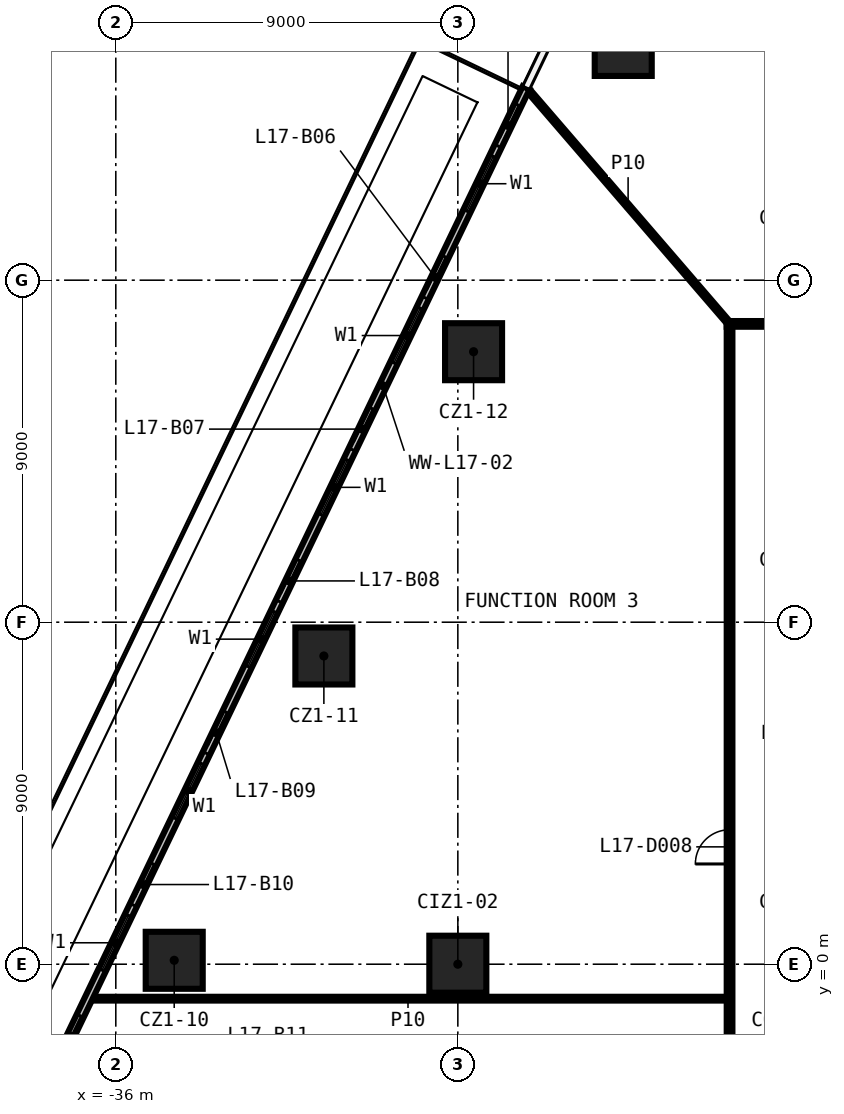
"""IFC4 building model, lengths in metres.
Left out: names, types, materials, properties, quantities, classifications, styles, units other than length and angle.
Written with IfcOpenShell. Run it as: python <this file> out.ifc"""

import sys

from ifc_helpers import new_model, si_unit, direction, frame, frame_2d, origin, origin_2d, place, context, subcontext, project, spatial, rectangle, extrude, element, fill, save


model = new_model("IFC4")
c1 = context("Model", 3, precision=1e-05, world=origin(), true_north=direction((0.0, 1.0)))
c2 = subcontext(c1, "Body", "Model", "MODEL_VIEW")
j1 = project(units=[si_unit("LENGTHUNIT", "METRE"), si_unit("PLANEANGLEUNIT", "RADIAN")], contexts=[c1])
p1 = place(None, origin())
s1 = spatial("IfcSite", under=j1, at=p1, CompositionType="ELEMENT")
p2 = place(p1, origin())
s2 = spatial("IfcBuilding", under=s1, at=p2, CompositionType="ELEMENT")
p3 = place(p2, frame((0.0, 0.0, 84.7)))
s3 = spatial("IfcBuildingStorey", under=s2, at=p3, CompositionType="ELEMENT", Elevation=84.7)
for number, where, z_axis, x_axis in (
    (1, (-34.463, 0.103, 0.0), (0.0, 0.0, 1.0), (1.0, 0.0, 0.0)),
    (2, (-30.525, 8.111, 0.0), (0.0, 0.0, 1.0), (1.0, 0.0, 0.0)),
    (3, (-26.586, 16.118, 0.0), (0.0, 0.0, 1.0), (1.0, 0.0, 0.0)),
    (4, (-22.648, 24.125, 0.0), (0.0, 0.0, 1.0), (1.0, 0.0, 0.0)),
    (5, (-27.0, 0.0, 0.0), (0.0, 0.0, 1.0), (1.0, 0.0, 0.0)),
):
    element("IfcColumn", number, at=place(p3, frame(where, z_axis=z_axis, x_axis=x_axis)), inside=s3, PredefinedType="COLUMN", context=c2, shape_type="SweptSolid", body=[
        extrude(rectangle(XDim=1.5, YDim=1.5, at=origin_2d()), origin(), (0.0, 0.0, 1.0), 3.9),
    ])
p4 = place(p3, frame((-36.698, -0.907, 0.0), z_axis=(0.0, 0.0, 1.0), x_axis=(1.0, 0.0, 0.0)))
e6 = element("IfcWall", 6, at=p4, inside=s3, PredefinedType="PARTITIONING", context=c2, shape_type="SweptSolid", body=[
    extrude(rectangle(XDim=16.772, YDim=0.1, at=frame_2d((8.386, 0.0))), origin(), (0.0, 0.0, 1.0), 3.9),
])
p5 = place(p3, frame((-19.925, 16.85, 0.0), z_axis=(0.0, 0.0, 1.0), x_axis=(1.0, 0.0, 0.0)))
e7 = element("IfcWall", 7, at=p5, inside=s3, PredefinedType="PARTITIONING", context=c2, shape_type="SweptSolid", body=[
    extrude(rectangle(XDim=39.85, YDim=0.15, at=frame_2d((19.925, 0.0))), origin(), (0.0, 0.0, 1.0), 3.9),
])
p6 = place(p5, frame((13.017, 0.0, 0.0)))
e8 = element("IfcOpeningElement", 8, at=p6, cuts=e7, PredefinedType="OPENING", context=c2, shape_type="SweptSolid", body=[
    extrude(rectangle(XDim=0.9, YDim=2.1, at=frame_2d((0.45, 1.05))), frame((0.0, 0.085, 0.0), z_axis=(0.0, -1.0, 0.0), x_axis=(1.0, 0.0, 0.0)), (0.0, 0.0, 1.0), 0.17),
])
p7 = place(p5, frame((3.887, 0.0, 0.0)))
e9 = element("IfcOpeningElement", 9, at=p7, cuts=e7, PredefinedType="OPENING", context=c2, shape_type="SweptSolid", body=[
    extrude(rectangle(XDim=0.9, YDim=2.1, at=frame_2d((0.45, 1.05))), frame((0.0, 0.085, 0.0), z_axis=(0.0, -1.0, 0.0), x_axis=(1.0, 0.0, 0.0)), (0.0, 0.0, 1.0), 0.17),
])
p8 = place(p3, frame((-19.85, -16.775, 0.0), z_axis=(0.0, 0.0, 1.0), x_axis=(0.0, 1.0, 0.0)))
e10 = element("IfcWall", 10, at=p8, inside=s3, PredefinedType="PARTITIONING", context=c2, shape_type="SweptSolid", body=[
    extrude(rectangle(XDim=33.55, YDim=0.15, at=frame_2d((16.775, 0.0))), origin(), (0.0, 0.0, 1.0), 3.9),
])
p9 = place(p8, frame((4.232, 0.0, 0.0)))
e11 = element("IfcOpeningElement", 11, at=p9, cuts=e10, PredefinedType="OPENING", context=c2, shape_type="SweptSolid", body=[
    extrude(rectangle(XDim=0.9, YDim=2.1, at=frame_2d((0.45, 1.05))), frame((0.0, 0.085, 0.0), z_axis=(0.0, -1.0, 0.0), x_axis=(1.0, 0.0, 0.0)), (0.0, 0.0, 1.0), 0.17),
])
p10 = place(p8, frame((19.413, 0.0, 0.0)))
e12 = element("IfcOpeningElement", 12, at=p10, cuts=e10, PredefinedType="OPENING", context=c2, shape_type="SweptSolid", body=[
    extrude(rectangle(XDim=0.9, YDim=2.1, at=frame_2d((0.45, 1.05))), frame((0.0, 0.085, 0.0), z_axis=(0.0, -1.0, 0.0), x_axis=(1.0, 0.0, 0.0)), (0.0, 0.0, 1.0), 0.17),
])
p11 = place(p3, frame((-25.189, 23.046, 0.0), z_axis=(0.0, 0.0, 1.0), x_axis=(0.652758316805, -0.757566221424, 0.0)))
e13 = element("IfcWall", 13, at=p11, inside=s3, PredefinedType="PARTITIONING", context=c2, shape_type="SweptSolid", body=[
    extrude(rectangle(XDim=8.178, YDim=0.1, at=frame_2d((4.089, 0.0))), origin(), (0.0, 0.0, 1.0), 3.9),
])
p12 = place(p3, frame((-25.203, 23.062, 0.0), z_axis=(0.0, 0.0, 1.0), x_axis=(-0.4330751292, -0.901357827097, 0.0)))
e14 = element("IfcWall", 14, at=p12, inside=s3, PredefinedType="SOLIDWALL", context=c2, shape_type="SweptSolid", body=[
    extrude(rectangle(XDim=31.024, YDim=0.2, at=frame_2d((15.512, 0.0))), origin(), (0.0, 0.0, 1.0), 3.9),
])
p13 = place(p12, frame((2.0, 0.0, 0.6)))
e15 = element("IfcOpeningElement", 15, at=p13, cuts=e14, PredefinedType="OPENING", context=c2, shape_type="SweptSolid", body=[
    extrude(rectangle(XDim=1.6, YDim=2.4, at=frame_2d((0.8, 1.2))), frame((0.0, 0.11, 0.0), z_axis=(0.0, -1.0, 0.0), x_axis=(1.0, 0.0, 0.0)), (0.0, 0.0, 1.0), 0.22),
])
p14 = place(p12, frame((0.5, 0.0, 0.0)))
e16 = element("IfcOpeningElement", 16, at=p14, cuts=e14, PredefinedType="OPENING", context=c2, shape_type="SweptSolid", body=[
    extrude(rectangle(XDim=1.2, YDim=2.4, at=frame_2d((0.6, 1.2))), frame((0.0, 0.11, 0.0), z_axis=(0.0, -1.0, 0.0), x_axis=(1.0, 0.0, 0.0)), (0.0, 0.0, 1.0), 0.22),
])
p15 = place(p12, frame((6.432, 0.0, 0.6)))
e17 = element("IfcOpeningElement", 17, at=p15, cuts=e14, PredefinedType="OPENING", context=c2, shape_type="SweptSolid", body=[
    extrude(rectangle(XDim=1.6, YDim=2.4, at=frame_2d((0.8, 1.2))), frame((0.0, 0.11, 0.0), z_axis=(0.0, -1.0, 0.0), x_axis=(1.0, 0.0, 0.0)), (0.0, 0.0, 1.0), 0.22),
])
p16 = place(p12, frame((4.932, 0.0, 0.0)))
e18 = element("IfcOpeningElement", 18, at=p16, cuts=e14, PredefinedType="OPENING", context=c2, shape_type="SweptSolid", body=[
    extrude(rectangle(XDim=1.2, YDim=2.4, at=frame_2d((0.6, 1.2))), frame((0.0, 0.11, 0.0), z_axis=(0.0, -1.0, 0.0), x_axis=(1.0, 0.0, 0.0)), (0.0, 0.0, 1.0), 0.22),
])
p17 = place(p12, frame((10.864, 0.0, 0.6)))
e19 = element("IfcOpeningElement", 19, at=p17, cuts=e14, PredefinedType="OPENING", context=c2, shape_type="SweptSolid", body=[
    extrude(rectangle(XDim=1.6, YDim=2.4, at=frame_2d((0.8, 1.2))), frame((0.0, 0.11, 0.0), z_axis=(0.0, -1.0, 0.0), x_axis=(1.0, 0.0, 0.0)), (0.0, 0.0, 1.0), 0.22),
])
p18 = place(p12, frame((9.364, 0.0, 0.0)))
e20 = element("IfcOpeningElement", 20, at=p18, cuts=e14, PredefinedType="OPENING", context=c2, shape_type="SweptSolid", body=[
    extrude(rectangle(XDim=1.2, YDim=2.4, at=frame_2d((0.6, 1.2))), frame((0.0, 0.11, 0.0), z_axis=(0.0, -1.0, 0.0), x_axis=(1.0, 0.0, 0.0)), (0.0, 0.0, 1.0), 0.22),
])
p19 = place(p12, frame((15.296, 0.0, 0.6)))
e21 = element("IfcOpeningElement", 21, at=p19, cuts=e14, PredefinedType="OPENING", context=c2, shape_type="SweptSolid", body=[
    extrude(rectangle(XDim=1.6, YDim=2.4, at=frame_2d((0.8, 1.2))), frame((0.0, 0.11, 0.0), z_axis=(0.0, -1.0, 0.0), x_axis=(1.0, 0.0, 0.0)), (0.0, 0.0, 1.0), 0.22),
])
p20 = place(p12, frame((13.796, 0.0, 0.0)))
e22 = element("IfcOpeningElement", 22, at=p20, cuts=e14, PredefinedType="OPENING", context=c2, shape_type="SweptSolid", body=[
    extrude(rectangle(XDim=1.2, YDim=2.4, at=frame_2d((0.6, 1.2))), frame((0.0, 0.11, 0.0), z_axis=(0.0, -1.0, 0.0), x_axis=(1.0, 0.0, 0.0)), (0.0, 0.0, 1.0), 0.22),
])
p21 = place(p12, frame((19.728, 0.0, 0.6)))
e23 = element("IfcOpeningElement", 23, at=p21, cuts=e14, PredefinedType="OPENING", context=c2, shape_type="SweptSolid", body=[
    extrude(rectangle(XDim=1.6, YDim=2.4, at=frame_2d((0.8, 1.2))), frame((0.0, 0.11, 0.0), z_axis=(0.0, -1.0, 0.0), x_axis=(1.0, 0.0, 0.0)), (0.0, 0.0, 1.0), 0.22),
])
p22 = place(p12, frame((18.228, 0.0, 0.0)))
e24 = element("IfcOpeningElement", 24, at=p22, cuts=e14, PredefinedType="OPENING", context=c2, shape_type="SweptSolid", body=[
    extrude(rectangle(XDim=1.2, YDim=2.4, at=frame_2d((0.6, 1.2))), frame((0.0, 0.11, 0.0), z_axis=(0.0, -1.0, 0.0), x_axis=(1.0, 0.0, 0.0)), (0.0, 0.0, 1.0), 0.22),
])
p23 = place(p12, frame((24.16, 0.0, 0.6)))
e25 = element("IfcOpeningElement", 25, at=p23, cuts=e14, PredefinedType="OPENING", context=c2, shape_type="SweptSolid", body=[
    extrude(rectangle(XDim=1.6, YDim=2.4, at=frame_2d((0.8, 1.2))), frame((0.0, 0.11, 0.0), z_axis=(0.0, -1.0, 0.0), x_axis=(1.0, 0.0, 0.0)), (0.0, 0.0, 1.0), 0.22),
])
p24 = place(p12, frame((22.66, 0.0, 0.0)))
e26 = element("IfcOpeningElement", 26, at=p24, cuts=e14, PredefinedType="OPENING", context=c2, shape_type="SweptSolid", body=[
    extrude(rectangle(XDim=1.2, YDim=2.4, at=frame_2d((0.6, 1.2))), frame((0.0, 0.11, 0.0), z_axis=(0.0, -1.0, 0.0), x_axis=(1.0, 0.0, 0.0)), (0.0, 0.0, 1.0), 0.22),
])
p25 = place(p12, frame((28.592, 0.0, 0.6)))
e27 = element("IfcOpeningElement", 27, at=p25, cuts=e14, PredefinedType="OPENING", context=c2, shape_type="SweptSolid", body=[
    extrude(rectangle(XDim=1.6, YDim=2.4, at=frame_2d((0.8, 1.2))), frame((0.0, 0.11, 0.0), z_axis=(0.0, -1.0, 0.0), x_axis=(1.0, 0.0, 0.0)), (0.0, 0.0, 1.0), 0.22),
])
p26 = place(p12, frame((27.092, 0.0, 0.0)))
e28 = element("IfcOpeningElement", 28, at=p26, cuts=e14, PredefinedType="OPENING", context=c2, shape_type="SweptSolid", body=[
    extrude(rectangle(XDim=1.2, YDim=2.4, at=frame_2d((0.6, 1.2))), frame((0.0, 0.11, 0.0), z_axis=(0.0, -1.0, 0.0), x_axis=(1.0, 0.0, 0.0)), (0.0, 0.0, 1.0), 0.22),
])
p27 = place(p10, origin())
e29 = element("IfcDoor", 29, at=p27, inside=s3, OperationType="SINGLE_SWING_RIGHT", PredefinedType="DOOR", context=c2, shape_type="SweptSolid", body=[
    extrude(rectangle(XDim=0.9, YDim=2.1, at=frame_2d((0.45, 1.05))), frame((0.0, 0.025, 0.0), z_axis=(0.0, -1.0, 0.0), x_axis=(1.0, 0.0, 0.0)), (0.0, 0.0, 1.0), 0.05),
])
fill(e12, e29)
p28 = place(p13, origin())
e30 = element("IfcWindow", 30, at=p28, inside=s3, PartitioningType="SINGLE_PANEL", PredefinedType="WINDOW", context=c2, shape_type="SweptSolid", body=[
    extrude(rectangle(XDim=1.6, YDim=2.4, at=frame_2d((0.8, 1.2))), frame((0.0, 0.03, 0.0), z_axis=(0.0, -1.0, 0.0), x_axis=(1.0, 0.0, 0.0)), (0.0, 0.0, 1.0), 0.06),
])
fill(e15, e30)
p29 = place(p14, origin())
e31 = element("IfcDoor", 31, at=p29, inside=s3, OperationType="SLIDING_TO_LEFT", PredefinedType="DOOR", context=c2, shape_type="SweptSolid", body=[
    extrude(rectangle(XDim=1.2, YDim=2.4, at=frame_2d((0.6, 1.2))), frame((0.0, 0.025, 0.0), z_axis=(0.0, -1.0, 0.0), x_axis=(1.0, 0.0, 0.0)), (0.0, 0.0, 1.0), 0.05),
])
fill(e16, e31)
p30 = place(p15, origin())
e32 = element("IfcWindow", 32, at=p30, inside=s3, PartitioningType="SINGLE_PANEL", PredefinedType="WINDOW", context=c2, shape_type="SweptSolid", body=[
    extrude(rectangle(XDim=1.6, YDim=2.4, at=frame_2d((0.8, 1.2))), frame((0.0, 0.03, 0.0), z_axis=(0.0, -1.0, 0.0), x_axis=(1.0, 0.0, 0.0)), (0.0, 0.0, 1.0), 0.06),
])
fill(e17, e32)
p31 = place(p16, origin())
e33 = element("IfcDoor", 33, at=p31, inside=s3, OperationType="SLIDING_TO_LEFT", PredefinedType="DOOR", context=c2, shape_type="SweptSolid", body=[
    extrude(rectangle(XDim=1.2, YDim=2.4, at=frame_2d((0.6, 1.2))), frame((0.0, 0.025, 0.0), z_axis=(0.0, -1.0, 0.0), x_axis=(1.0, 0.0, 0.0)), (0.0, 0.0, 1.0), 0.05),
])
fill(e18, e33)
p32 = place(p17, origin())
e34 = element("IfcWindow", 34, at=p32, inside=s3, PartitioningType="SINGLE_PANEL", PredefinedType="WINDOW", context=c2, shape_type="SweptSolid", body=[
    extrude(rectangle(XDim=1.6, YDim=2.4, at=frame_2d((0.8, 1.2))), frame((0.0, 0.03, 0.0), z_axis=(0.0, -1.0, 0.0), x_axis=(1.0, 0.0, 0.0)), (0.0, 0.0, 1.0), 0.06),
])
fill(e19, e34)
p33 = place(p18, origin())
e35 = element("IfcDoor", 35, at=p33, inside=s3, OperationType="SLIDING_TO_LEFT", PredefinedType="DOOR", context=c2, shape_type="SweptSolid", body=[
    extrude(rectangle(XDim=1.2, YDim=2.4, at=frame_2d((0.6, 1.2))), frame((0.0, 0.025, 0.0), z_axis=(0.0, -1.0, 0.0), x_axis=(1.0, 0.0, 0.0)), (0.0, 0.0, 1.0), 0.05),
])
fill(e20, e35)
p34 = place(p19, origin())
e36 = element("IfcWindow", 36, at=p34, inside=s3, PartitioningType="SINGLE_PANEL", PredefinedType="WINDOW", context=c2, shape_type="SweptSolid", body=[
    extrude(rectangle(XDim=1.6, YDim=2.4, at=frame_2d((0.8, 1.2))), frame((0.0, 0.03, 0.0), z_axis=(0.0, -1.0, 0.0), x_axis=(1.0, 0.0, 0.0)), (0.0, 0.0, 1.0), 0.06),
])
fill(e21, e36)
p35 = place(p20, origin())
e37 = element("IfcDoor", 37, at=p35, inside=s3, OperationType="SLIDING_TO_LEFT", PredefinedType="DOOR", context=c2, shape_type="SweptSolid", body=[
    extrude(rectangle(XDim=1.2, YDim=2.4, at=frame_2d((0.6, 1.2))), frame((0.0, 0.025, 0.0), z_axis=(0.0, -1.0, 0.0), x_axis=(1.0, 0.0, 0.0)), (0.0, 0.0, 1.0), 0.05),
])
fill(e22, e37)
p36 = place(p21, origin())
e38 = element("IfcWindow", 38, at=p36, inside=s3, PartitioningType="SINGLE_PANEL", PredefinedType="WINDOW", context=c2, shape_type="SweptSolid", body=[
    extrude(rectangle(XDim=1.6, YDim=2.4, at=frame_2d((0.8, 1.2))), frame((0.0, 0.03, 0.0), z_axis=(0.0, -1.0, 0.0), x_axis=(1.0, 0.0, 0.0)), (0.0, 0.0, 1.0), 0.06),
])
fill(e23, e38)
p37 = place(p22, origin())
e39 = element("IfcDoor", 39, at=p37, inside=s3, OperationType="SLIDING_TO_LEFT", PredefinedType="DOOR", context=c2, shape_type="SweptSolid", body=[
    extrude(rectangle(XDim=1.2, YDim=2.4, at=frame_2d((0.6, 1.2))), frame((0.0, 0.025, 0.0), z_axis=(0.0, -1.0, 0.0), x_axis=(1.0, 0.0, 0.0)), (0.0, 0.0, 1.0), 0.05),
])
fill(e24, e39)
p38 = place(p23, origin())
e40 = element("IfcWindow", 40, at=p38, inside=s3, PartitioningType="SINGLE_PANEL", PredefinedType="WINDOW", context=c2, shape_type="SweptSolid", body=[
    extrude(rectangle(XDim=1.6, YDim=2.4, at=frame_2d((0.8, 1.2))), frame((0.0, 0.03, 0.0), z_axis=(0.0, -1.0, 0.0), x_axis=(1.0, 0.0, 0.0)), (0.0, 0.0, 1.0), 0.06),
])
fill(e25, e40)
p39 = place(p24, origin())
e41 = element("IfcDoor", 41, at=p39, inside=s3, OperationType="SLIDING_TO_LEFT", PredefinedType="DOOR", context=c2, shape_type="SweptSolid", body=[
    extrude(rectangle(XDim=1.2, YDim=2.4, at=frame_2d((0.6, 1.2))), frame((0.0, 0.025, 0.0), z_axis=(0.0, -1.0, 0.0), x_axis=(1.0, 0.0, 0.0)), (0.0, 0.0, 1.0), 0.05),
])
fill(e26, e41)
p40 = place(p26, origin())
e42 = element("IfcDoor", 42, at=p40, inside=s3, OperationType="SLIDING_TO_LEFT", PredefinedType="DOOR", context=c2, shape_type="SweptSolid", body=[
    extrude(rectangle(XDim=1.2, YDim=2.4, at=frame_2d((0.6, 1.2))), frame((0.0, 0.025, 0.0), z_axis=(0.0, -1.0, 0.0), x_axis=(1.0, 0.0, 0.0)), (0.0, 0.0, 1.0), 0.05),
])
fill(e28, e42)
save(model, sys.argv[1])
